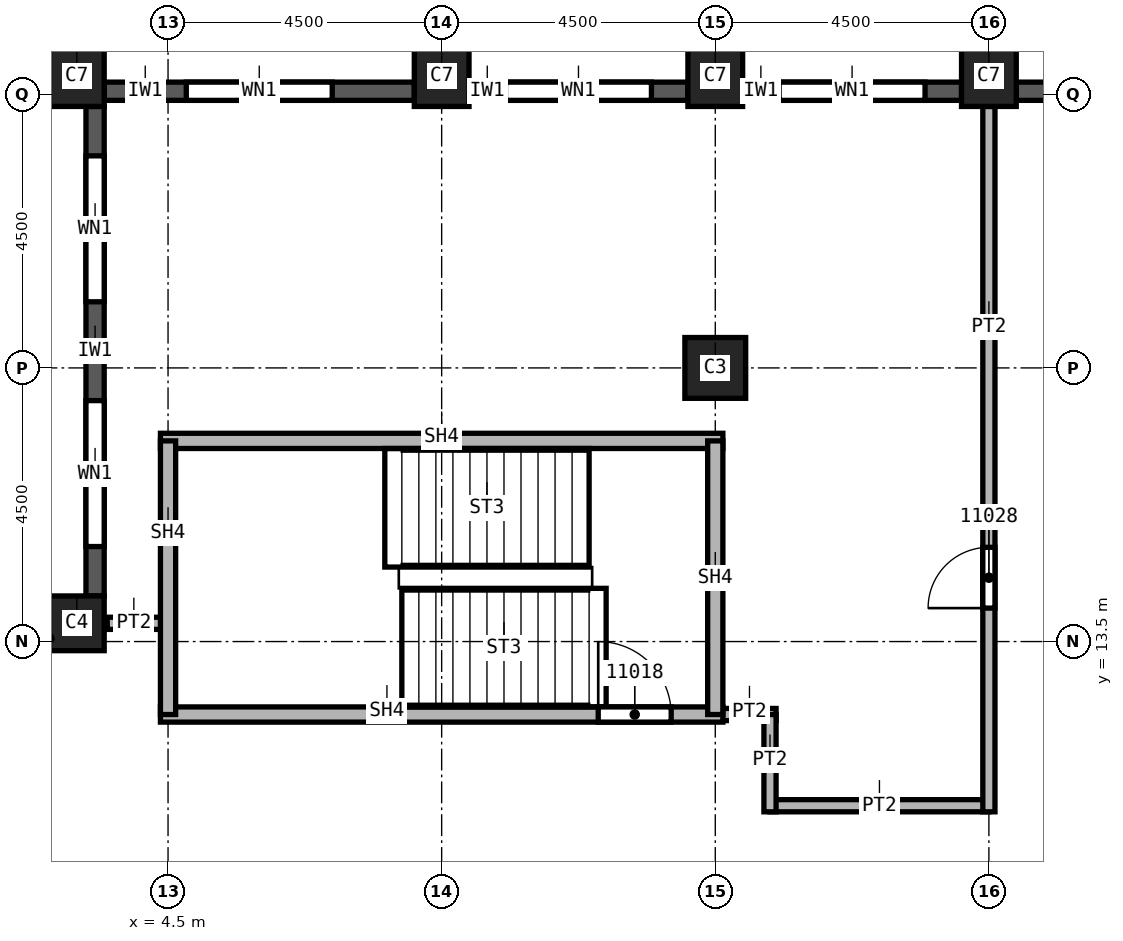
"""IFC4 building model, lengths in metres.
Left out: names, types, materials, properties, quantities, classifications, styles, units other than length and angle.
Written with IfcOpenShell. Run it as: python <this file> out.ifc"""

import sys

from ifc_helpers import new_model, si_unit, direction, frame, frame_2d, origin, origin_2d, place, context, subcontext, project, spatial, rectangle, extrude, element, fill, save


model = new_model("IFC4")
c1 = context("Model", 3, precision=1e-05, world=origin(), true_north=direction((0.0, 1.0)))
c2 = subcontext(c1, "Body", "Model", "MODEL_VIEW")
j1 = project(units=[si_unit("LENGTHUNIT", "METRE"), si_unit("PLANEANGLEUNIT", "RADIAN")], contexts=[c1])
p1 = place(None, origin())
s1 = spatial("IfcSite", under=j1, at=p1, CompositionType="ELEMENT")
p2 = place(p1, origin())
s2 = spatial("IfcBuilding", under=s1, at=p2, CompositionType="ELEMENT")
p3 = place(p2, frame((0.0, 0.0, 188.0)))
s3 = spatial("IfcBuildingStorey", under=s2, at=p3, CompositionType="ELEMENT", Elevation=188.0)
p4 = place(p3, frame((13.5, 18.0, 0.0), z_axis=(0.0, 0.0, 1.0), x_axis=(1.0, 0.0, 0.0)))
e1 = element("IfcColumn", 1, at=p4, inside=s3, PredefinedType="COLUMN", context=c2, shape_type="SweptSolid", body=[
    extrude(rectangle(XDim=1.0, YDim=1.0, at=origin_2d()), origin(), (0.0, 0.0, 1.0), 3.72),
])
for number, where, z_axis, x_axis in (
    (2, (3.0, 22.8, 0.0), (0.0, 0.0, 1.0), (1.0, 0.0, 0.0)),
    (3, (9.0, 22.8, 0.0), (0.0, 0.0, 1.0), (1.0, 0.0, 0.0)),
    (4, (13.5, 22.8, 0.0), (0.0, 0.0, 1.0), (1.0, 0.0, 0.0)),
    (5, (18.0, 22.8, 0.0), (0.0, 0.0, 1.0), (1.0, 0.0, 0.0)),
):
    element("IfcColumn", number, at=place(p3, frame(where, z_axis=z_axis, x_axis=x_axis)), inside=s3, PredefinedType="COLUMN", context=c2, shape_type="SweptSolid", body=[
        extrude(rectangle(XDim=0.9, YDim=1.0, at=origin_2d()), origin(), (0.0, 0.0, 1.0), 3.72),
    ])
p5 = place(p3, frame((3.0, 13.8, 0.0), z_axis=(0.0, 0.0, 1.0), x_axis=(1.0, 0.0, 0.0)))
e6 = element("IfcColumn", 6, at=p5, inside=s3, PredefinedType="COLUMN", context=c2, shape_type="SweptSolid", body=[
    extrude(rectangle(XDim=0.9, YDim=0.9, at=origin_2d()), origin(), (0.0, 0.0, 1.0), 3.72),
])
p6 = place(p3, frame((22.05, 22.55, 0.0), z_axis=(0.0, 0.0, 1.0), x_axis=(-1.0, 0.0, 0.0)))
e7 = element("IfcWall", 7, at=p6, inside=s3, PredefinedType="SOLIDWALL", context=c2, shape_type="SweptSolid", body=[
    extrude(rectangle(XDim=3.6, YDim=0.3, at=frame_2d((1.8, 0.0))), origin(), (0.0, 0.0, 1.0), 3.12),
])
p7 = place(p6, frame((0.775, 0.0, 0.8)))
e8 = element("IfcOpeningElement", 8, at=p7, cuts=e7, PredefinedType="OPENING", context=c2, shape_type="SweptSolid", body=[
    extrude(rectangle(XDim=1.0, YDim=1.95, at=frame_2d((0.5, 0.975))), frame((0.0, 0.15, 0.0), z_axis=(0.0, -1.0, 0.0), x_axis=(1.0, 0.0, 0.0)), (0.0, 0.0, 1.0), 0.3),
])
p8 = place(p6, frame((2.375, 0.0, 0.8)))
e9 = element("IfcOpeningElement", 9, at=p8, cuts=e7, PredefinedType="OPENING", context=c2, shape_type="SweptSolid", body=[
    extrude(rectangle(XDim=0.6, YDim=1.95, at=frame_2d((0.3, 0.975))), frame((0.0, 0.15, 0.0), z_axis=(0.0, -1.0, 0.0), x_axis=(1.0, 0.0, 0.0)), (0.0, 0.0, 1.0), 0.3),
])
p9 = place(p3, frame((17.55, 22.55, 0.0), z_axis=(0.0, 0.0, 1.0), x_axis=(-1.0, 0.0, 0.0)))
e10 = element("IfcWall", 10, at=p9, inside=s3, PredefinedType="SOLIDWALL", context=c2, shape_type="SweptSolid", body=[
    extrude(rectangle(XDim=3.6, YDim=0.3, at=frame_2d((1.8, 0.0))), origin(), (0.0, 0.0, 1.0), 3.12),
])
p10 = place(p9, frame((0.6, 0.0, 0.8)))
e11 = element("IfcOpeningElement", 11, at=p10, cuts=e10, PredefinedType="OPENING", context=c2, shape_type="SweptSolid", body=[
    extrude(rectangle(XDim=2.4, YDim=1.95, at=frame_2d((1.2, 0.975))), frame((0.0, 0.15, 0.0), z_axis=(0.0, -1.0, 0.0), x_axis=(1.0, 0.0, 0.0)), (0.0, 0.0, 1.0), 0.3),
])
p11 = place(p3, frame((13.05, 22.55, 0.0), z_axis=(0.0, 0.0, 1.0), x_axis=(-1.0, 0.0, 0.0)))
e12 = element("IfcWall", 12, at=p11, inside=s3, PredefinedType="SOLIDWALL", context=c2, shape_type="SweptSolid", body=[
    extrude(rectangle(XDim=3.6, YDim=0.3, at=frame_2d((1.8, 0.0))), origin(), (0.0, 0.0, 1.0), 3.12),
])
p12 = place(p11, frame((0.6, 0.0, 0.8)))
e13 = element("IfcOpeningElement", 13, at=p12, cuts=e12, PredefinedType="OPENING", context=c2, shape_type="SweptSolid", body=[
    extrude(rectangle(XDim=2.4, YDim=1.95, at=frame_2d((1.2, 0.975))), frame((0.0, 0.15, 0.0), z_axis=(0.0, -1.0, 0.0), x_axis=(1.0, 0.0, 0.0)), (0.0, 0.0, 1.0), 0.3),
])
p13 = place(p3, frame((8.55, 22.55, 0.0), z_axis=(0.0, 0.0, 1.0), x_axis=(-1.0, 0.0, 0.0)))
e14 = element("IfcWall", 14, at=p13, inside=s3, PredefinedType="SOLIDWALL", context=c2, shape_type="SweptSolid", body=[
    extrude(rectangle(XDim=5.1, YDim=0.3, at=frame_2d((2.55, 0.0))), origin(), (0.0, 0.0, 1.0), 3.12),
])
p14 = place(p13, frame((1.35, 0.0, 0.8)))
e15 = element("IfcOpeningElement", 15, at=p14, cuts=e14, PredefinedType="OPENING", context=c2, shape_type="SweptSolid", body=[
    extrude(rectangle(XDim=2.4, YDim=1.95, at=frame_2d((1.2, 0.975))), frame((0.0, 0.15, 0.0), z_axis=(0.0, -1.0, 0.0), x_axis=(1.0, 0.0, 0.0)), (0.0, 0.0, 1.0), 0.3),
])
p15 = place(p3, frame((3.3, 22.3, 0.0), z_axis=(0.0, 0.0, 1.0), x_axis=(0.0, -1.0, 0.0)))
e16 = element("IfcWall", 16, at=p15, inside=s3, PredefinedType="SOLIDWALL", context=c2, shape_type="SweptSolid", body=[
    extrude(rectangle(XDim=8.05, YDim=0.3, at=frame_2d((4.025, 0.0))), origin(), (0.0, 0.0, 1.0), 3.12),
])
p16 = place(p15, frame((0.812, 0.0, 0.8)))
e17 = element("IfcOpeningElement", 17, at=p16, cuts=e16, PredefinedType="OPENING", context=c2, shape_type="SweptSolid", body=[
    extrude(rectangle(XDim=2.4, YDim=1.95, at=frame_2d((1.2, 0.975))), frame((0.0, 0.15, 0.0), z_axis=(0.0, -1.0, 0.0), x_axis=(1.0, 0.0, 0.0)), (0.0, 0.0, 1.0), 0.3),
])
p17 = place(p15, frame((4.837, 0.0, 0.8)))
e18 = element("IfcOpeningElement", 18, at=p17, cuts=e16, PredefinedType="OPENING", context=c2, shape_type="SweptSolid", body=[
    extrude(rectangle(XDim=2.4, YDim=1.95, at=frame_2d((1.2, 0.975))), frame((0.0, 0.15, 0.0), z_axis=(0.0, -1.0, 0.0), x_axis=(1.0, 0.0, 0.0)), (0.0, 0.0, 1.0), 0.3),
])
p18 = place(p3, frame((3.5, 13.8, 0.0), z_axis=(0.0, 0.0, 1.0), x_axis=(1.0, 0.0, 0.0)))
e19 = element("IfcWall", 19, at=p18, inside=s3, PredefinedType="PARTITIONING", context=c2, shape_type="SweptSolid", body=[
    extrude(rectangle(XDim=1.0, YDim=0.2, at=frame_2d((0.5, 0.0))), origin(), (0.0, 0.0, 1.0), 3.72),
])
p19 = place(p3, frame((13.375, 12.3, 0.0), z_axis=(0.0, 0.0, 1.0), x_axis=(1.0, 0.0, 0.0)))
e20 = element("IfcWall", 20, at=p19, inside=s3, PredefinedType="PARTITIONING", context=c2, shape_type="SweptSolid", body=[
    extrude(rectangle(XDim=1.125, YDim=0.2, at=frame_2d((0.562, 0.0))), origin(), (0.0, 0.0, 1.0), 3.72),
])
p20 = place(p3, frame((14.4, 10.8, 0.0), z_axis=(0.0, 0.0, 1.0), x_axis=(1.0, 0.0, 0.0)))
e21 = element("IfcWall", 21, at=p20, inside=s3, PredefinedType="PARTITIONING", context=c2, shape_type="SweptSolid", body=[
    extrude(rectangle(XDim=3.6, YDim=0.2, at=frame_2d((1.8, 0.0))), origin(), (0.0, 0.0, 1.0), 3.72),
])
p21 = place(p3, frame((14.4, 12.3, 0.0), z_axis=(0.0, 0.0, 1.0), x_axis=(0.0, -1.0, 0.0)))
e22 = element("IfcWall", 22, at=p21, inside=s3, PredefinedType="PARTITIONING", context=c2, shape_type="SweptSolid", body=[
    extrude(rectangle(XDim=1.6, YDim=0.2, at=frame_2d((0.8, 0.0))), origin(), (0.0, 0.0, 1.0), 3.72),
])
p22 = place(p3, frame((18.0, 10.7, 0.0), z_axis=(0.0, 0.0, 1.0), x_axis=(0.0, 1.0, 0.0)))
e23 = element("IfcWall", 23, at=p22, inside=s3, PredefinedType="PARTITIONING", context=c2, shape_type="SweptSolid", body=[
    extrude(rectangle(XDim=11.6, YDim=0.2, at=frame_2d((5.8, 0.0))), origin(), (0.0, 0.0, 1.0), 3.72),
])
p23 = place(p22, frame((3.35, 0.0, 0.0)))
e24 = element("IfcOpeningElement", 24, at=p23, cuts=e23, PredefinedType="OPENING", context=c2, shape_type="SweptSolid", body=[
    extrude(rectangle(XDim=1.0, YDim=2.1, at=frame_2d((0.5, 1.05))), frame((0.0, 0.1, 0.0), z_axis=(0.0, -1.0, 0.0), x_axis=(1.0, 0.0, 0.0)), (0.0, 0.0, 1.0), 0.2),
])
p24 = place(p3, frame((4.375, 12.3, 0.0), z_axis=(0.0, 0.0, 1.0), x_axis=(1.0, 0.0, 0.0)))
e25 = element("IfcWall", 25, at=p24, inside=s3, PredefinedType="SOLIDWALL", context=c2, shape_type="SweptSolid", body=[
    extrude(rectangle(XDim=9.25, YDim=0.25, at=frame_2d((4.625, 0.0))), origin(), (0.0, 0.0, 1.0), 3.72),
])
p25 = place(p24, frame((7.2, 0.0, 0.0)))
e26 = element("IfcOpeningElement", 26, at=p25, cuts=e25, PredefinedType="OPENING", context=c2, shape_type="SweptSolid", body=[
    extrude(rectangle(XDim=1.2, YDim=2.1, at=frame_2d((0.6, 1.05))), frame((0.0, 0.125, 0.0), z_axis=(0.0, -1.0, 0.0), x_axis=(1.0, 0.0, 0.0)), (0.0, 0.0, 1.0), 0.25),
])
p26 = place(p3, frame((4.375, 16.8, 0.0), z_axis=(0.0, 0.0, 1.0), x_axis=(1.0, 0.0, 0.0)))
e27 = element("IfcWall", 27, at=p26, inside=s3, PredefinedType="SOLIDWALL", context=c2, shape_type="SweptSolid", body=[
    extrude(rectangle(XDim=9.25, YDim=0.25, at=frame_2d((4.625, 0.0))), origin(), (0.0, 0.0, 1.0), 3.72),
])
for number, where, z_axis, x_axis in (
    (28, (4.5, 12.3, 0.0), (0.0, 0.0, 1.0), (0.0, 1.0, 0.0)),
    (29, (13.5, 16.8, 0.0), (0.0, 0.0, 1.0), (0.0, -1.0, 0.0)),
):
    element("IfcWall", number, at=place(p3, frame(where, z_axis=z_axis, x_axis=x_axis)), inside=s3, PredefinedType="SOLIDWALL", context=c2, shape_type="SweptSolid", body=[
        extrude(rectangle(XDim=4.5, YDim=0.25, at=frame_2d((2.25, 0.0))), origin(), (0.0, 0.0, 1.0), 3.72),
    ])
p27 = place(p10, origin())
e30 = element("IfcWindow", 30, at=p27, inside=s3, PartitioningType="SINGLE_PANEL", PredefinedType="WINDOW", context=c2, shape_type="SweptSolid", body=[
    extrude(rectangle(XDim=2.4, YDim=1.95, at=frame_2d((1.2, 0.975))), frame((0.0, 0.03, 0.0), z_axis=(0.0, -1.0, 0.0), x_axis=(1.0, 0.0, 0.0)), (0.0, 0.0, 1.0), 0.06),
])
fill(e11, e30)
p28 = place(p12, origin())
e31 = element("IfcWindow", 31, at=p28, inside=s3, PartitioningType="SINGLE_PANEL", PredefinedType="WINDOW", context=c2, shape_type="SweptSolid", body=[
    extrude(rectangle(XDim=2.4, YDim=1.95, at=frame_2d((1.2, 0.975))), frame((0.0, 0.03, 0.0), z_axis=(0.0, -1.0, 0.0), x_axis=(1.0, 0.0, 0.0)), (0.0, 0.0, 1.0), 0.06),
])
fill(e13, e31)
p29 = place(p14, origin())
e32 = element("IfcWindow", 32, at=p29, inside=s3, PartitioningType="SINGLE_PANEL", PredefinedType="WINDOW", context=c2, shape_type="SweptSolid", body=[
    extrude(rectangle(XDim=2.4, YDim=1.95, at=frame_2d((1.2, 0.975))), frame((0.0, 0.03, 0.0), z_axis=(0.0, -1.0, 0.0), x_axis=(1.0, 0.0, 0.0)), (0.0, 0.0, 1.0), 0.06),
])
fill(e15, e32)
p30 = place(p16, origin())
e33 = element("IfcWindow", 33, at=p30, inside=s3, PartitioningType="SINGLE_PANEL", PredefinedType="WINDOW", context=c2, shape_type="SweptSolid", body=[
    extrude(rectangle(XDim=2.4, YDim=1.95, at=frame_2d((1.2, 0.975))), frame((0.0, 0.03, 0.0), z_axis=(0.0, -1.0, 0.0), x_axis=(1.0, 0.0, 0.0)), (0.0, 0.0, 1.0), 0.06),
])
fill(e17, e33)
p31 = place(p17, origin())
e34 = element("IfcWindow", 34, at=p31, inside=s3, PartitioningType="SINGLE_PANEL", PredefinedType="WINDOW", context=c2, shape_type="SweptSolid", body=[
    extrude(rectangle(XDim=2.4, YDim=1.95, at=frame_2d((1.2, 0.975))), frame((0.0, 0.03, 0.0), z_axis=(0.0, -1.0, 0.0), x_axis=(1.0, 0.0, 0.0)), (0.0, 0.0, 1.0), 0.06),
])
fill(e18, e34)
p32 = place(p25, origin())
e35 = element("IfcDoor", 35, at=p32, inside=s3, OperationType="SINGLE_SWING_LEFT", PredefinedType="DOOR", context=c2, shape_type="SweptSolid", body=[
    extrude(rectangle(XDim=1.2, YDim=2.1, at=frame_2d((0.6, 1.05))), frame((0.0, 0.025, 0.0), z_axis=(0.0, -1.0, 0.0), x_axis=(1.0, 0.0, 0.0)), (0.0, 0.0, 1.0), 0.05),
])
fill(e26, e35)
p33 = place(p23, origin())
e36 = element("IfcDoor", 36, at=p33, inside=s3, OperationType="SINGLE_SWING_LEFT", PredefinedType="DOOR", context=c2, shape_type="SweptSolid", body=[
    extrude(rectangle(XDim=1.0, YDim=2.1, at=frame_2d((0.5, 1.05))), frame((0.0, 0.025, 0.0), z_axis=(0.0, -1.0, 0.0), x_axis=(1.0, 0.0, 0.0)), (0.0, 0.0, 1.0), 0.05),
])
fill(e24, e36)
save(model, sys.argv[1])
